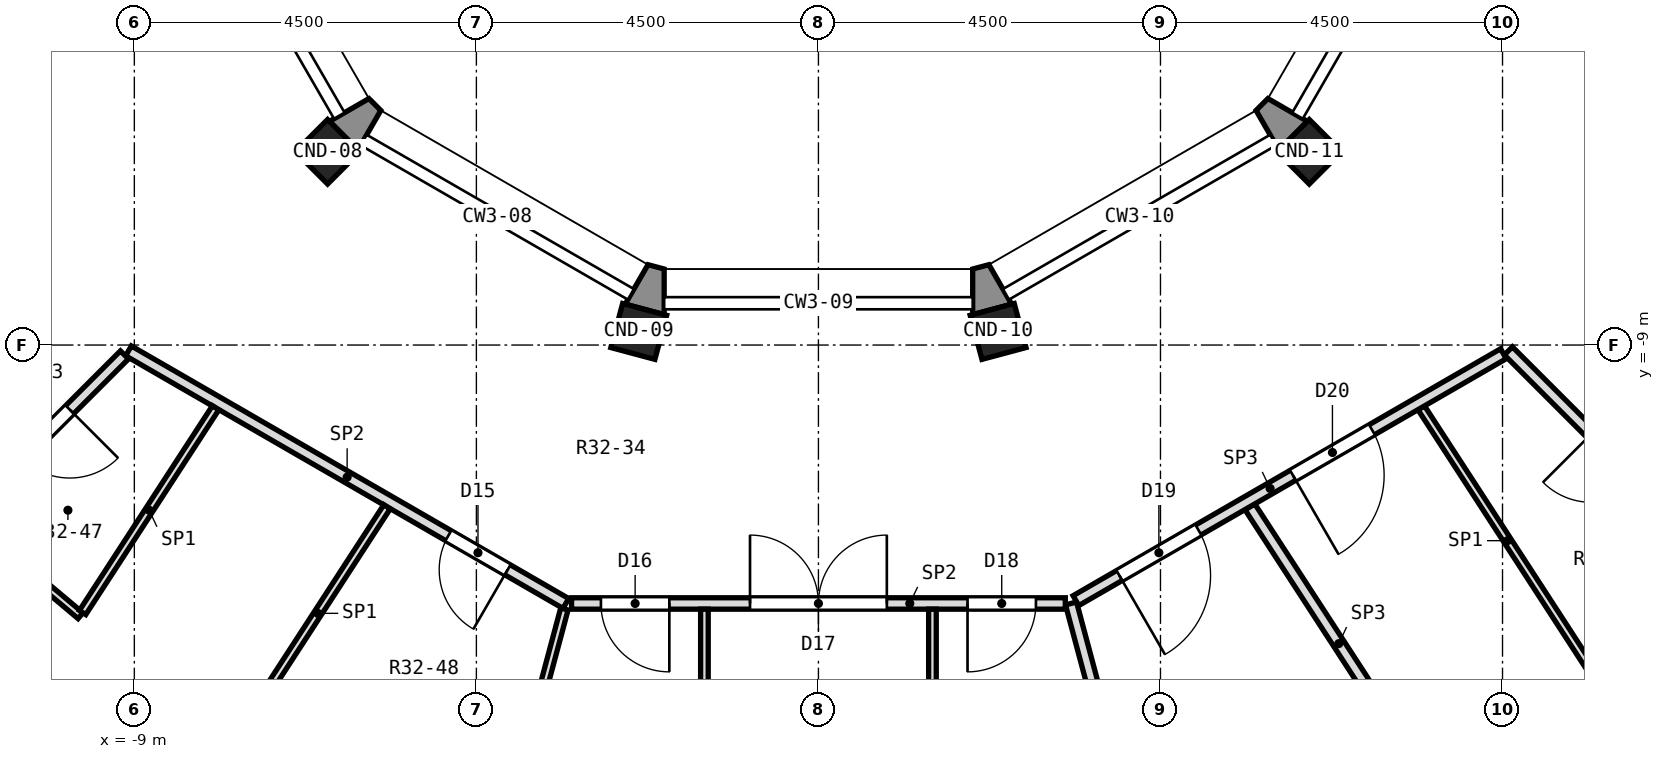
"""IFC4 building model, lengths in metres.
Left out: names, types, materials, properties, quantities, classifications, styles, units other than length and angle.
Written with IfcOpenShell. Run it as: python <this file> out.ifc"""

import sys

from ifc_helpers import new_model, si_unit, direction, frame, frame_2d, origin, origin_2d, place, context, subcontext, project, spatial, polyline, rectangle, outline, extrude, element, fill, save


model = new_model("IFC4")
c1 = context("Model", 3, precision=1e-05, world=origin(), true_north=direction((0.0, 1.0)))
c2 = subcontext(c1, "Body", "Model", "MODEL_VIEW")
j1 = project(units=[si_unit("LENGTHUNIT", "METRE"), si_unit("PLANEANGLEUNIT", "RADIAN")], contexts=[c1])
p1 = place(None, origin())
s1 = spatial("IfcSite", under=j1, at=p1, CompositionType="ELEMENT")
p2 = place(p1, origin())
s2 = spatial("IfcBuilding", under=s1, at=p2, CompositionType="ELEMENT")
p3 = place(p2, frame((0.0, 0.0, 224.7)))
s3 = spatial("IfcBuildingStorey", under=s2, at=p3, CompositionType="ELEMENT", Elevation=224.7)
for number, where, z_axis, x_axis in (
    (1, (-6.458, -6.458, 0.0), (0.0, 0.0, 1.0), (-0.707, -0.707, 0.0)),
    (2, (-2.364, -8.821, 0.0), (0.0, 0.0, 1.0), (-0.259, -0.966, 0.0)),
    (3, (2.364, -8.821, 0.0), (0.0, 0.0, 1.0), (0.259, -0.966, 0.0)),
    (4, (6.458, -6.458, 0.0), (0.0, 0.0, 1.0), (0.707, -0.707, 0.0)),
):
    element("IfcColumn", number, at=place(p3, frame(where, z_axis=z_axis, x_axis=x_axis)), inside=s3, PredefinedType="COLUMN", context=c2, shape_type="SweptSolid", body=[
        extrude(rectangle(XDim=0.6, YDim=0.6, at=origin_2d()), origin(), (0.0, 0.0, 1.0), 5.0),
    ])
p4 = place(p3, origin())
e5 = element("IfcWall", 5, at=p4, inside=s3, PredefinedType="SOLIDWALL", context=c2, shape_type="SweptSolid", body=[
    extrude(outline(polyline([(-6.058, -6.433), (-5.758, -5.914), (-5.914, -5.758), (-6.433, -6.058), (-6.058, -6.433)])), origin(), (0.0, 0.0, 1.0), 4.6),
])
p5 = place(p3, origin())
e6 = element("IfcWall", 6, at=p5, inside=s3, PredefinedType="SOLIDWALL", context=c2, shape_type="SweptSolid", body=[
    extrude(outline(polyline([(-2.029, -8.6), (-2.029, -8.0), (-2.242, -7.943), (-2.542, -8.462), (-2.029, -8.6)])), origin(), (0.0, 0.0, 1.0), 4.6),
])
p6 = place(p3, origin())
e7 = element("IfcWall", 7, at=p6, inside=s3, PredefinedType="SOLIDWALL", context=c2, shape_type="SweptSolid", body=[
    extrude(outline(polyline([(2.542, -8.462), (2.242, -7.943), (2.029, -8.0), (2.029, -8.6), (2.542, -8.462)])), origin(), (0.0, 0.0, 1.0), 4.6),
])
p7 = place(p3, origin())
e8 = element("IfcWall", 8, at=p7, inside=s3, PredefinedType="SOLIDWALL", context=c2, shape_type="SweptSolid", body=[
    extrude(outline(polyline([(6.433, -6.058), (5.914, -5.758), (5.758, -5.914), (6.058, -6.433), (6.433, -6.058)])), origin(), (0.0, 0.0, 1.0), 4.6),
])
p8 = place(p3, frame((3.323, -12.4, 0.0), z_axis=(0.0, 0.0, 1.0), x_axis=(0.258646238559, -0.965972113096, 0.0)))
e9 = element("IfcWall", 9, at=p8, inside=s3, PredefinedType="PARTITIONING", context=c2, shape_type="SweptSolid", body=[
    extrude(rectangle(XDim=3.939, YDim=0.15, at=frame_2d((1.969, 0.0))), origin(), (0.0, 0.0, 1.0), 4.6),
])
p9 = place(p3, frame((5.676, -11.128, 0.0), z_axis=(0.0, 0.0, 1.0), x_axis=(0.544832434593, -0.838544941083, 0.0)))
e10 = element("IfcWall", 10, at=p9, inside=s3, PredefinedType="PARTITIONING", context=c2, shape_type="SweptSolid", body=[
    extrude(rectangle(XDim=4.293, YDim=0.15, at=frame_2d((2.146, 0.0))), origin(), (0.0, 0.0, 1.0), 4.6),
])
p10 = place(p3, frame((7.931, -9.826, 0.0), z_axis=(0.0, 0.0, 1.0), x_axis=(0.544576550515, -0.838711142545, 0.0)))
e11 = element("IfcWall", 11, at=p10, inside=s3, PredefinedType="PARTITIONING", context=c2, shape_type="SweptSolid", body=[
    extrude(rectangle(XDim=4.168, YDim=0.1, at=frame_2d((2.084, 0.0))), origin(), (0.0, 0.0, 1.0), 4.6),
])
p11 = place(p3, frame((9.077, -9.077, 0.0), z_axis=(0.0, 0.0, 1.0), x_axis=(0.707106781187, -0.707106781187, 0.0)))
e12 = element("IfcWall", 12, at=p11, inside=s3, PredefinedType="PARTITIONING", context=c2, shape_type="SweptSolid", body=[
    extrude(rectangle(XDim=5.852, YDim=0.15, at=frame_2d((2.926, 0.0))), origin(), (0.0, 0.0, 1.0), 4.6),
])
p12 = place(p11, frame((1.545, 0.0, 0.0)))
e13 = element("IfcOpeningElement", 13, at=p12, cuts=e12, PredefinedType="OPENING", context=c2, shape_type="SweptSolid", body=[
    extrude(rectangle(XDim=0.9, YDim=2.1, at=frame_2d((0.45, 1.05))), frame((0.0, 0.087, 0.0), z_axis=(0.0, -1.0, 0.0), x_axis=(1.0, 0.0, 0.0)), (0.0, 0.0, 1.0), 0.174),
])
p13 = place(p3, frame((-11.202, -11.307, 0.0), z_axis=(0.0, 0.0, 1.0), x_axis=(0.765897191843, -0.642963056114, 0.0)))
e14 = element("IfcWall", 14, at=p13, inside=s3, PredefinedType="PARTITIONING", context=c2, shape_type="SweptSolid", body=[
    extrude(rectangle(XDim=1.95, YDim=0.1, at=frame_2d((0.975, 0.0))), origin(), (0.0, 0.0, 1.0), 4.6),
])
p14 = place(p3, frame((-9.077, -9.077, 0.0), z_axis=(0.0, 0.0, 1.0), x_axis=(0.865961614908, -0.500110469302, 0.0)))
e15 = element("IfcWall", 15, at=p14, inside=s3, PredefinedType="PARTITIONING", context=c2, shape_type="SweptSolid", body=[
    extrude(rectangle(XDim=6.645, YDim=0.15, at=frame_2d((3.322, 0.0))), origin(), (0.0, 0.0, 1.0), 4.6),
])
p15 = place(p14, frame((4.86, 0.0, 0.0)))
e16 = element("IfcOpeningElement", 16, at=p15, cuts=e15, PredefinedType="OPENING", context=c2, shape_type="SweptSolid", body=[
    extrude(rectangle(XDim=0.9, YDim=2.1, at=frame_2d((0.45, 1.05))), frame((0.0, 0.087, 0.0), z_axis=(0.0, -1.0, 0.0), x_axis=(1.0, 0.0, 0.0)), (0.0, 0.0, 1.0), 0.174),
])
p16 = place(p3, frame((-3.248, -12.4, 0.0), z_axis=(0.0, 0.0, 1.0), x_axis=(1.0, 0.0, 0.0)))
e17 = element("IfcWall", 17, at=p16, inside=s3, PredefinedType="PARTITIONING", context=c2, shape_type="SweptSolid", body=[
    extrude(rectangle(XDim=6.496, YDim=0.15, at=frame_2d((3.248, 0.0))), origin(), (0.0, 0.0, 1.0), 4.6),
])
p17 = place(p16, frame((0.386, 0.0, 0.0)))
e18 = element("IfcOpeningElement", 18, at=p17, cuts=e17, PredefinedType="OPENING", context=c2, shape_type="SweptSolid", body=[
    extrude(rectangle(XDim=0.9, YDim=2.1, at=frame_2d((0.45, 1.05))), frame((0.0, 0.087, 0.0), z_axis=(0.0, -1.0, 0.0), x_axis=(1.0, 0.0, 0.0)), (0.0, 0.0, 1.0), 0.174),
])
p18 = place(p16, frame((2.348, 0.0, 0.0)))
e19 = element("IfcOpeningElement", 19, at=p18, cuts=e17, PredefinedType="OPENING", context=c2, shape_type="SweptSolid", body=[
    extrude(rectangle(XDim=1.8, YDim=2.1, at=frame_2d((0.9, 1.05))), frame((0.0, 0.087, 0.0), z_axis=(0.0, -1.0, 0.0), x_axis=(1.0, 0.0, 0.0)), (0.0, 0.0, 1.0), 0.174),
])
p19 = place(p16, frame((5.209, 0.0, 0.0)))
e20 = element("IfcOpeningElement", 20, at=p19, cuts=e17, PredefinedType="OPENING", context=c2, shape_type="SweptSolid", body=[
    extrude(rectangle(XDim=0.9, YDim=2.1, at=frame_2d((0.45, 1.05))), frame((0.0, 0.087, 0.0), z_axis=(0.0, -1.0, 0.0), x_axis=(1.0, 0.0, 0.0)), (0.0, 0.0, 1.0), 0.174),
])
p20 = place(p3, frame((3.388, -12.363, 0.0), z_axis=(0.0, 0.0, 1.0), x_axis=(0.865967095912, 0.5001009786, 0.0)))
e21 = element("IfcWall", 21, at=p20, inside=s3, PredefinedType="PARTITIONING", context=c2, shape_type="SweptSolid", body=[
    extrude(rectangle(XDim=6.495, YDim=0.15, at=frame_2d((3.248, 0.0))), origin(), (0.0, 0.0, 1.0), 4.6),
])
p21 = place(p20, frame((0.66, 0.0, 0.0)))
e22 = element("IfcOpeningElement", 22, at=p21, cuts=e21, PredefinedType="OPENING", context=c2, shape_type="SweptSolid", body=[
    extrude(rectangle(XDim=1.2, YDim=2.1, at=frame_2d((0.6, 1.05))), frame((0.0, 0.087, 0.0), z_axis=(0.0, -1.0, 0.0), x_axis=(1.0, 0.0, 0.0)), (0.0, 0.0, 1.0), 0.174),
])
p22 = place(p20, frame((3.297, 0.0, 0.0)))
e23 = element("IfcOpeningElement", 23, at=p22, cuts=e21, PredefinedType="OPENING", context=c2, shape_type="SweptSolid", body=[
    extrude(rectangle(XDim=1.2, YDim=2.1, at=frame_2d((0.6, 1.05))), frame((0.0, 0.087, 0.0), z_axis=(0.0, -1.0, 0.0), x_axis=(1.0, 0.0, 0.0)), (0.0, 0.0, 1.0), 0.174),
])
p23 = place(p3, frame((-13.215, -13.215, 0.0), z_axis=(0.0, 0.0, 1.0), x_axis=(0.707106781187, 0.707106781187, 0.0)))
e24 = element("IfcWall", 24, at=p23, inside=s3, PredefinedType="PARTITIONING", context=c2, shape_type="SweptSolid", body=[
    extrude(rectangle(XDim=5.777, YDim=0.15, at=frame_2d((2.888, 0.0))), origin(), (0.0, 0.0, 1.0), 4.6),
])
p24 = place(p23, frame((3.859, 0.0, 0.0)))
e25 = element("IfcOpeningElement", 25, at=p24, cuts=e24, PredefinedType="OPENING", context=c2, shape_type="SweptSolid", body=[
    extrude(rectangle(XDim=0.9, YDim=2.1, at=frame_2d((0.45, 1.05))), frame((0.0, 0.087, 0.0), z_axis=(0.0, -1.0, 0.0), x_axis=(1.0, 0.0, 0.0)), (0.0, 0.0, 1.0), 0.174),
])
p25 = place(p23, frame((0.456, 0.0, 0.0)))
e26 = element("IfcOpeningElement", 26, at=p25, cuts=e24, PredefinedType="OPENING", context=c2, shape_type="SweptSolid", body=[
    extrude(rectangle(XDim=1.8, YDim=2.1, at=frame_2d((0.9, 1.05))), frame((0.0, 0.087, 0.0), z_axis=(0.0, -1.0, 0.0), x_axis=(1.0, 0.0, 0.0)), (0.0, 0.0, 1.0), 0.174),
])
p26 = place(p3, frame((-7.497, -13.931, 0.0), z_axis=(0.0, 0.0, 1.0), x_axis=(0.54476755827, 0.838587089966, 0.0)))
e27 = element("IfcWall", 27, at=p26, inside=s3, PredefinedType="PARTITIONING", context=c2, shape_type="SweptSolid", body=[
    extrude(rectangle(XDim=3.343, YDim=0.1, at=frame_2d((1.671, 0.0))), origin(), (0.0, 0.0, 1.0), 4.6),
])
p27 = place(p3, frame((-9.681, -12.519, 0.0), z_axis=(0.0, 0.0, 1.0), x_axis=(0.544873455053, 0.838518287206, 0.0)))
e28 = element("IfcWall", 28, at=p27, inside=s3, PredefinedType="PARTITIONING", context=c2, shape_type="SweptSolid", body=[
    extrude(rectangle(XDim=3.212, YDim=0.1, at=frame_2d((1.606, 0.0))), origin(), (0.0, 0.0, 1.0), 4.6),
])
p28 = place(p3, frame((-5.645, -21.072, 0.0), z_axis=(0.0, 0.0, 1.0), x_axis=(0.258659321195, 0.965968610028, 0.0)))
e29 = element("IfcWall", 29, at=p28, inside=s3, PredefinedType="PARTITIONING", context=c2, shape_type="SweptSolid", body=[
    extrude(rectangle(XDim=8.903, YDim=0.1, at=frame_2d((4.451, 0.0))), origin(), (0.0, 0.0, 1.0), 4.6),
])
for number, where, z_axis, x_axis in (
    (30, (1.5, -16.25, 0.0), (0.0, 0.0, 1.0), (0.0, 1.0, 0.0)),
    (31, (-1.5, -16.25, 0.0), (0.0, 0.0, 1.0), (0.0, 1.0, 0.0)),
):
    element("IfcWall", number, at=place(p3, frame(where, z_axis=z_axis, x_axis=x_axis)), inside=s3, PredefinedType="PARTITIONING", context=c2, shape_type="SweptSolid", body=[
        extrude(rectangle(XDim=3.775, YDim=0.1, at=frame_2d((1.887, 0.0))), origin(), (0.0, 0.0, 1.0), 4.6),
    ])
p29 = place(p24, frame((0.9, 0.0, 0.0), z_axis=(0.0, 0.0, 1.0), x_axis=(-1.0, 0.0, 0.0)))
e32 = element("IfcDoor", 32, at=p29, inside=s3, OperationType="SINGLE_SWING_LEFT", PredefinedType="DOOR", context=c2, shape_type="SweptSolid", body=[
    extrude(rectangle(XDim=0.9, YDim=2.1, at=frame_2d((0.45, 1.05))), frame((0.0, 0.025, 0.0), z_axis=(0.0, -1.0, 0.0), x_axis=(1.0, 0.0, 0.0)), (0.0, 0.0, 1.0), 0.05),
])
fill(e25, e32)
p30 = place(p15, frame((0.9, 0.0, 0.0), z_axis=(0.0, 0.0, 1.0), x_axis=(-1.0, 0.0, 0.0)))
e33 = element("IfcDoor", 33, at=p30, inside=s3, OperationType="SINGLE_SWING_LEFT", PredefinedType="DOOR", context=c2, shape_type="SweptSolid", body=[
    extrude(rectangle(XDim=0.9, YDim=2.1, at=frame_2d((0.45, 1.05))), frame((0.0, 0.025, 0.0), z_axis=(0.0, -1.0, 0.0), x_axis=(1.0, 0.0, 0.0)), (0.0, 0.0, 1.0), 0.05),
])
fill(e16, e33)
p31 = place(p17, frame((0.9, 0.0, 0.0), z_axis=(0.0, 0.0, 1.0), x_axis=(-1.0, 0.0, 0.0)))
e34 = element("IfcDoor", 34, at=p31, inside=s3, OperationType="SINGLE_SWING_LEFT", PredefinedType="DOOR", context=c2, shape_type="SweptSolid", body=[
    extrude(rectangle(XDim=0.9, YDim=2.1, at=frame_2d((0.45, 1.05))), frame((0.0, 0.025, 0.0), z_axis=(0.0, -1.0, 0.0), x_axis=(1.0, 0.0, 0.0)), (0.0, 0.0, 1.0), 0.05),
])
fill(e18, e34)
p32 = place(p18, origin())
e35 = element("IfcDoor", 35, at=p32, inside=s3, OperationType="DOUBLE_DOOR_SINGLE_SWING", PredefinedType="DOOR", context=c2, shape_type="SweptSolid", body=[
    extrude(rectangle(XDim=1.8, YDim=2.1, at=frame_2d((0.9, 1.05))), frame((0.0, 0.025, 0.0), z_axis=(0.0, -1.0, 0.0), x_axis=(1.0, 0.0, 0.0)), (0.0, 0.0, 1.0), 0.05),
])
fill(e19, e35)
p33 = place(p19, frame((0.9, 0.0, 0.0), z_axis=(0.0, 0.0, 1.0), x_axis=(-1.0, 0.0, 0.0)))
e36 = element("IfcDoor", 36, at=p33, inside=s3, OperationType="SINGLE_SWING_RIGHT", PredefinedType="DOOR", context=c2, shape_type="SweptSolid", body=[
    extrude(rectangle(XDim=0.9, YDim=2.1, at=frame_2d((0.45, 1.05))), frame((0.0, 0.025, 0.0), z_axis=(0.0, -1.0, 0.0), x_axis=(1.0, 0.0, 0.0)), (0.0, 0.0, 1.0), 0.05),
])
fill(e20, e36)
p34 = place(p21, frame((1.2, 0.0, 0.0), z_axis=(0.0, 0.0, 1.0), x_axis=(-1.0, 0.0, 0.0)))
e37 = element("IfcDoor", 37, at=p34, inside=s3, OperationType="SINGLE_SWING_RIGHT", PredefinedType="DOOR", context=c2, shape_type="SweptSolid", body=[
    extrude(rectangle(XDim=1.2, YDim=2.1, at=frame_2d((0.6, 1.05))), frame((0.0, 0.025, 0.0), z_axis=(0.0, -1.0, 0.0), x_axis=(1.0, 0.0, 0.0)), (0.0, 0.0, 1.0), 0.05),
])
fill(e22, e37)
p35 = place(p22, frame((1.2, 0.0, 0.0), z_axis=(0.0, 0.0, 1.0), x_axis=(-1.0, 0.0, 0.0)))
e38 = element("IfcDoor", 38, at=p35, inside=s3, OperationType="SINGLE_SWING_RIGHT", PredefinedType="DOOR", context=c2, shape_type="SweptSolid", body=[
    extrude(rectangle(XDim=1.2, YDim=2.1, at=frame_2d((0.6, 1.05))), frame((0.0, 0.025, 0.0), z_axis=(0.0, -1.0, 0.0), x_axis=(1.0, 0.0, 0.0)), (0.0, 0.0, 1.0), 0.05),
])
fill(e23, e38)
save(model, sys.argv[1])
